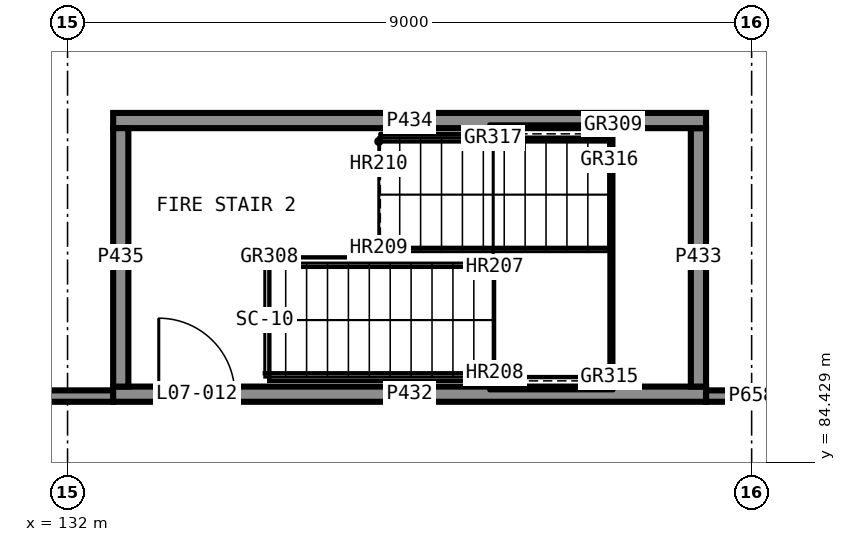
"""IFC4 building model, lengths in metres.
Left out: names, types, materials, properties, quantities, classifications, styles, units other than length and angle.
Written with IfcOpenShell. Run it as: python <this file> out.ifc"""

import sys

from ifc_helpers import new_model, si_unit, direction, frame, frame_2d, origin, place, context, subcontext, project, spatial, rectangle, extrude, element, fill, save


model = new_model("IFC4")
c1 = context("Model", 3, precision=1e-05, world=origin(), true_north=direction((0.0, 1.0)))
c2 = subcontext(c1, "Body", "Model", "MODEL_VIEW")
j1 = project(units=[si_unit("LENGTHUNIT", "METRE"), si_unit("PLANEANGLEUNIT", "RADIAN")], contexts=[c1])
p1 = place(None, origin())
s1 = spatial("IfcSite", under=j1, at=p1, CompositionType="ELEMENT")
p2 = place(p1, origin())
s2 = spatial("IfcBuilding", under=s1, at=p2, CompositionType="ELEMENT")
p3 = place(p2, frame((0.0, 0.0, 29.5)))
s3 = spatial("IfcBuildingStorey", under=s2, at=p3, CompositionType="ELEMENT", Elevation=29.5)
p4 = place(p3, frame((132.6, 85.325, 0.0), z_axis=(0.0, 0.0, 1.0), x_axis=(1.0, 0.0, 0.0)))
e1 = element("IfcWall", 1, at=p4, inside=s3, PredefinedType="SHEAR", context=c2, shape_type="SweptSolid", body=[
    extrude(rectangle(XDim=7.8, YDim=0.2, at=frame_2d((3.9, 0.0))), origin(), (0.0, 0.0, 1.0), 3.75),
])
p5 = place(p4, frame((0.6, 0.0, 0.0)))
e2 = element("IfcOpeningElement", 2, at=p5, cuts=e1, PredefinedType="OPENING", context=c2, shape_type="SweptSolid", body=[
    extrude(rectangle(XDim=1.0, YDim=2.1, at=frame_2d((0.5, 1.05))), frame((0.0, 0.11, 0.0), z_axis=(0.0, -1.0, 0.0), x_axis=(1.0, 0.0, 0.0)), (0.0, 0.0, 1.0), 0.22),
])
p6 = place(p3, frame((140.3, 85.425, 0.0), z_axis=(0.0, 0.0, 1.0), x_axis=(0.0, 1.0, 0.0)))
e3 = element("IfcWall", 3, at=p6, inside=s3, PredefinedType="SHEAR", context=c2, shape_type="SweptSolid", body=[
    extrude(rectangle(XDim=3.4, YDim=0.2, at=frame_2d((1.7, 0.0))), origin(), (0.0, 0.0, 1.0), 3.75),
])
p7 = place(p3, frame((140.4, 88.925, 0.0), z_axis=(0.0, 0.0, 1.0), x_axis=(-1.0, 0.0, 0.0)))
e4 = element("IfcWall", 4, at=p7, inside=s3, PredefinedType="SHEAR", context=c2, shape_type="SweptSolid", body=[
    extrude(rectangle(XDim=7.8, YDim=0.2, at=frame_2d((3.9, 0.0))), origin(), (0.0, 0.0, 1.0), 3.75),
])
p8 = place(p3, frame((132.7, 88.825, 0.0), z_axis=(0.0, 0.0, 1.0), x_axis=(0.0, -1.0, 0.0)))
e5 = element("IfcWall", 5, at=p8, inside=s3, PredefinedType="SHEAR", context=c2, shape_type="SweptSolid", body=[
    extrude(rectangle(XDim=3.4, YDim=0.2, at=frame_2d((1.7, 0.0))), origin(), (0.0, 0.0, 1.0), 3.75),
])
p9 = place(p3, frame((122.7, 85.3, 0.0), z_axis=(0.0, 0.0, 1.0), x_axis=(1.0, 0.0, 0.0)))
e6 = element("IfcWall", 6, at=p9, inside=s3, PredefinedType="PARTITIONING", context=c2, shape_type="SweptSolid", body=[
    extrude(rectangle(XDim=9.9, YDim=0.15, at=frame_2d((4.95, 0.0))), origin(), (0.0, 0.0, 1.0), 3.75),
])
p10 = place(p9, frame((2.8, 0.0, 0.0)))
e7 = element("IfcOpeningElement", 7, at=p10, cuts=e6, PredefinedType="OPENING", context=c2, shape_type="SweptSolid", body=[
    extrude(rectangle(XDim=1.0, YDim=2.1, at=frame_2d((0.5, 1.05))), frame((0.0, 0.085, 0.0), z_axis=(0.0, -1.0, 0.0), x_axis=(1.0, 0.0, 0.0)), (0.0, 0.0, 1.0), 0.17),
])
p11 = place(p3, frame((140.4, 85.3, 0.0), z_axis=(0.0, 0.0, 1.0), x_axis=(1.0, 0.0, 0.0)))
e8 = element("IfcWall", 8, at=p11, inside=s3, PredefinedType="PARTITIONING", context=c2, shape_type="SweptSolid", body=[
    extrude(rectangle(XDim=1.2, YDim=0.15, at=frame_2d((0.6, 0.0))), origin(), (0.0, 0.0, 1.0), 3.75),
])
p12 = place(p5, origin())
e9 = element("IfcDoor", 9, at=p12, inside=s3, OperationType="SINGLE_SWING_RIGHT", PredefinedType="DOOR", context=c2, shape_type="SweptSolid", body=[
    extrude(rectangle(XDim=1.0, YDim=2.1, at=frame_2d((0.5, 1.05))), frame((0.0, 0.025, 0.0), z_axis=(0.0, -1.0, 0.0), x_axis=(1.0, 0.0, 0.0)), (0.0, 0.0, 1.0), 0.05),
])
fill(e2, e9)
save(model, sys.argv[1])
